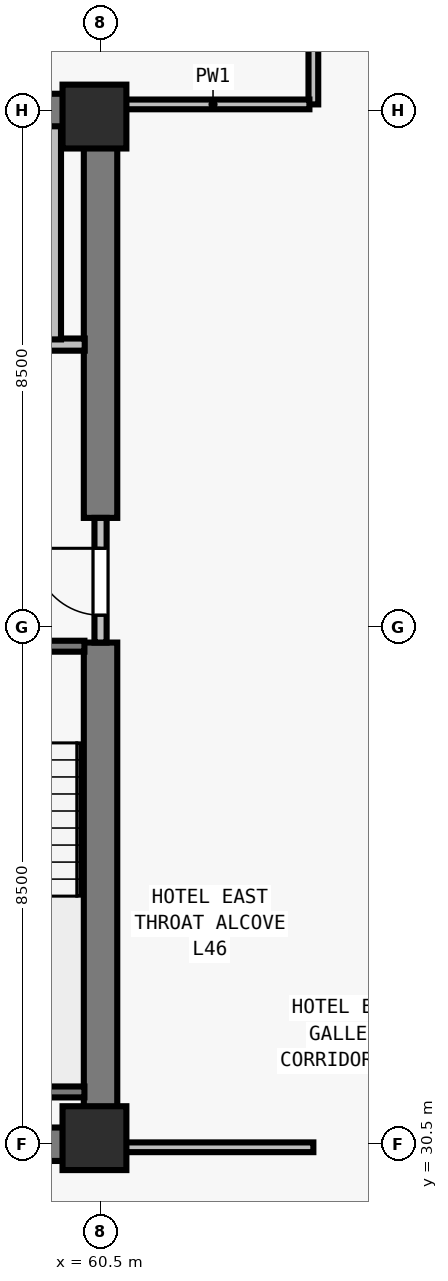
"""IFC4 building model, lengths in metres.
Left out: names, types, materials, properties, quantities, classifications, styles, units other than length and angle.
Written with IfcOpenShell. Run it as: python <this file> out.ifc"""

import sys

from ifc_helpers import new_model, si_unit, direction, frame, frame_2d, origin, origin_2d, place, context, subcontext, project, spatial, rectangle, extrude, element, fill, save


model = new_model("IFC4")
c1 = context("Model", 3, precision=1e-05, world=origin(), true_north=direction((0.0, 1.0)))
c2 = subcontext(c1, "Body", "Model", "MODEL_VIEW")
j1 = project(units=[si_unit("LENGTHUNIT", "METRE"), si_unit("PLANEANGLEUNIT", "RADIAN")], contexts=[c1])
p1 = place(None, origin())
s1 = spatial("IfcSite", under=j1, at=p1, CompositionType="ELEMENT")
p2 = place(p1, origin())
s2 = spatial("IfcBuilding", under=s1, at=p2, CompositionType="ELEMENT")
p3 = place(p2, frame((0.0, 0.0, 169.0)))
s3 = spatial("IfcBuildingStorey", under=s2, at=p3, CompositionType="ELEMENT", Elevation=169.0)
for number, where, z_axis, x_axis in (
    (1, (60.4, 30.6, 0.0), (0.0, 0.0, 1.0), (1.0, 0.0, 0.0)),
    (2, (60.4, 47.4, 0.0), (0.0, 0.0, 1.0), (1.0, 0.0, 0.0)),
):
    element("IfcColumn", number, at=place(p3, frame(where, z_axis=z_axis, x_axis=x_axis)), inside=s3, PredefinedType="COLUMN", context=c2, shape_type="SweptSolid", body=[
        extrude(rectangle(XDim=1.05, YDim=1.05, at=origin_2d()), origin(), (0.0, 0.0, 1.0), 3.5),
    ])
for number, where, z_axis, x_axis in (
    (3, (43.225, 30.5, 0.0), (0.0, 0.0, 1.0), (1.0, 0.0, 0.0)),
    (4, (43.225, 47.5, 0.0), (0.0, 0.0, 1.0), (1.0, 0.0, 0.0)),
):
    element("IfcWall", number, at=place(p3, frame(where, z_axis=z_axis, x_axis=x_axis)), inside=s3, PredefinedType="SHEAR", context=c2, shape_type="SweptSolid", body=[
        extrude(rectangle(XDim=17.55, YDim=0.55, at=frame_2d((8.775, 0.0))), origin(), (0.0, 0.0, 1.0), 3.28),
    ])
p4 = place(p3, frame((60.5, 30.765, 0.0), z_axis=(0.0, 0.0, 1.0), x_axis=(0.0, 1.0, 0.0)))
e5 = element("IfcWall", 5, at=p4, inside=s3, PredefinedType="SHEAR", context=c2, shape_type="SweptSolid", body=[
    extrude(rectangle(XDim=7.985, YDim=0.55, at=frame_2d((3.993, 0.0))), origin(), (0.0, 0.0, 1.0), 3.28),
])
p5 = place(p3, frame((60.5, 40.8, 0.0), z_axis=(0.0, 0.0, 1.0), x_axis=(0.0, 1.0, 0.0)))
e6 = element("IfcWall", 6, at=p5, inside=s3, PredefinedType="SHEAR", context=c2, shape_type="SweptSolid", body=[
    extrude(rectangle(XDim=6.435, YDim=0.55, at=frame_2d((3.218, 0.0))), origin(), (0.0, 0.0, 1.0), 3.28),
])
p6 = place(p3, frame((60.5, 38.75, 0.0), z_axis=(0.0, 0.0, 1.0), x_axis=(0.0, 1.0, 0.0)))
e7 = element("IfcWall", 7, at=p6, inside=s3, PredefinedType="SOLIDWALL", context=c2, shape_type="SweptSolid", body=[
    extrude(rectangle(XDim=2.05, YDim=0.2, at=frame_2d((1.025, 0.0))), origin(), (0.0, 0.0, 1.0), 3.28),
])
p7 = place(p6, frame((0.45, 0.0, 0.0)))
e8 = element("IfcOpeningElement", 8, at=p7, cuts=e7, PredefinedType="OPENING", context=c2, shape_type="SweptSolid", body=[
    extrude(rectangle(XDim=1.1, YDim=2.15, at=frame_2d((0.55, 1.075))), frame((0.0, 0.11, 0.0), z_axis=(0.0, -1.0, 0.0), x_axis=(1.0, 0.0, 0.0)), (0.0, 0.0, 1.0), 0.22),
])
p8 = place(p3, frame((56.735, 43.65, 0.0), z_axis=(0.0, 0.0, 1.0), x_axis=(1.0, 0.0, 0.0)))
e9 = element("IfcWall", 9, at=p8, inside=s3, PredefinedType="SOLIDWALL", context=c2, shape_type="SweptSolid", body=[
    extrude(rectangle(XDim=3.505, YDim=0.2, at=frame_2d((1.752, 0.0))), origin(), (0.0, 0.0, 1.0), 3.28),
])
p9 = place(p8, frame((1.295, 0.0, 0.0)))
e10 = element("IfcOpeningElement", 10, at=p9, cuts=e9, PredefinedType="OPENING", context=c2, shape_type="SweptSolid", body=[
    extrude(rectangle(XDim=1.1, YDim=2.2, at=frame_2d((0.55, 1.1))), frame((0.0, 0.11, 0.0), z_axis=(0.0, -1.0, 0.0), x_axis=(1.0, 0.0, 0.0)), (0.0, 0.0, 1.0), 0.22),
])
p10 = place(p3, frame((59.75, 43.735, 0.0), z_axis=(0.0, 0.0, 1.0), x_axis=(0.0, 1.0, 0.0)))
e11 = element("IfcWall", 11, at=p10, inside=s3, PredefinedType="SOLIDWALL", context=c2, shape_type="SweptSolid", body=[
    extrude(rectangle(XDim=3.505, YDim=0.2, at=frame_2d((1.752, 0.0))), origin(), (0.0, 0.0, 1.0), 3.28),
])
p11 = place(p3, frame((64.0, 47.6, 0.0), z_axis=(0.0, 0.0, 1.0), x_axis=(0.0, 1.0, 0.0)))
e12 = element("IfcWall", 12, at=p11, inside=s3, PredefinedType="PARTITIONING", context=c2, shape_type="SweptSolid", body=[
    extrude(rectangle(XDim=15.075, YDim=0.16, at=frame_2d((7.538, 0.0))), origin(), (0.0, 0.0, 1.0), 2.555),
])
p12 = place(p11, frame((3.5, 0.0, 0.0)))
e13 = element("IfcOpeningElement", 13, at=p12, cuts=e12, PredefinedType="OPENING", context=c2, shape_type="SweptSolid", body=[
    extrude(rectangle(XDim=0.96, YDim=2.12, at=frame_2d((0.48, 1.06))), frame((0.0, 0.09, 0.0), z_axis=(0.0, -1.0, 0.0), x_axis=(1.0, 0.0, 0.0)), (0.0, 0.0, 1.0), 0.18),
])
p13 = place(p3, frame((60.765, 30.45, 0.0), z_axis=(0.0, 0.0, 1.0), x_axis=(1.0, 0.0, 0.0)))
e14 = element("IfcWall", 14, at=p13, inside=s3, PredefinedType="PARTITIONING", context=c2, shape_type="SweptSolid", body=[
    extrude(rectangle(XDim=3.235, YDim=0.16, at=frame_2d((1.618, 0.0))), origin(), (0.0, 0.0, 1.0), 3.28),
])
p14 = place(p3, frame((60.765, 47.6, 0.0), z_axis=(0.0, 0.0, 1.0), x_axis=(1.0, 0.0, 0.0)))
e15 = element("IfcWall", 15, at=p14, inside=s3, PredefinedType="PARTITIONING", context=c2, shape_type="SweptSolid", body=[
    extrude(rectangle(XDim=3.17, YDim=0.16, at=frame_2d((1.585, 0.0))), origin(), (0.0, 0.0, 1.0), 3.28),
])
p15 = place(p3, frame((57.005, 38.69, 0.0), z_axis=(0.0, 0.0, 1.0), x_axis=(1.0, 0.0, 0.0)))
e16 = element("IfcWall", 16, at=p15, inside=s3, PredefinedType="SOLIDWALL", context=c2, shape_type="SweptSolid", body=[
    extrude(rectangle(XDim=3.23, YDim=0.18, at=frame_2d((1.615, 0.0))), origin(), (0.0, 0.0, 1.0), 3.28),
])
p16 = place(p15, frame((1.14, 0.0, 0.0)))
e17 = element("IfcOpeningElement", 17, at=p16, cuts=e16, PredefinedType="OPENING", context=c2, shape_type="SweptSolid", body=[
    extrude(rectangle(XDim=0.95, YDim=2.15, at=frame_2d((0.475, 1.075))), frame((0.0, 0.1, 0.0), z_axis=(0.0, -1.0, 0.0), x_axis=(1.0, 0.0, 0.0)), (0.0, 0.0, 1.0), 0.2),
])
p17 = place(p3, frame((57.005, 31.36, 0.0), z_axis=(0.0, 0.0, 1.0), x_axis=(1.0, 0.0, 0.0)))
e18 = element("IfcWall", 18, at=p17, inside=s3, PredefinedType="SOLIDWALL", context=c2, shape_type="SweptSolid", body=[
    extrude(rectangle(XDim=3.23, YDim=0.18, at=frame_2d((1.615, 0.0))), origin(), (0.0, 0.0, 1.0), 3.28),
])
p18 = place(p7, origin())
e19 = element("IfcDoor", 19, at=p18, inside=s3, OperationType="SINGLE_SWING_RIGHT", PredefinedType="DOOR", context=c2, shape_type="SweptSolid", body=[
    extrude(rectangle(XDim=1.1, YDim=2.15, at=frame_2d((0.55, 1.075))), frame((0.0, 0.025, 0.0), z_axis=(0.0, -1.0, 0.0), x_axis=(1.0, 0.0, 0.0)), (0.0, 0.0, 1.0), 0.05),
])
fill(e8, e19)
save(model, sys.argv[1])
